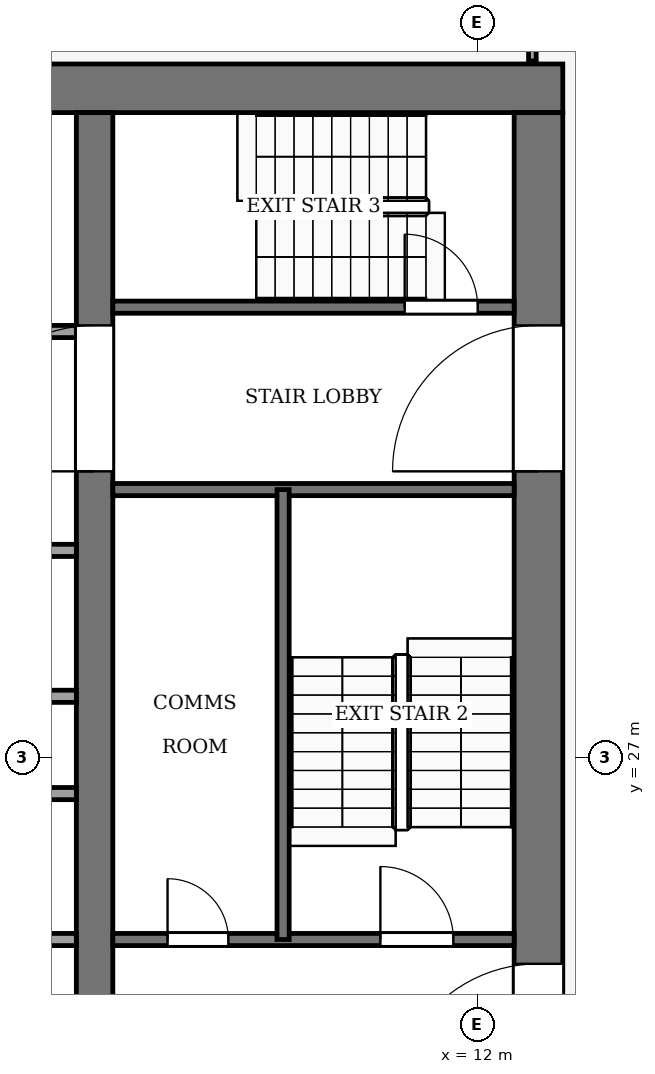
"""IFC4 building model, lengths in metres.
Left out: names, types, materials, properties, quantities, classifications, styles, units other than length and angle.
Written with IfcOpenShell. Run it as: python <this file> out.ifc"""

import sys

from ifc_helpers import new_model, si_unit, direction, frame, frame_2d, origin, place, context, subcontext, project, spatial, rectangle, extrude, element, fill, save


model = new_model("IFC4")
c1 = context("Model", 3, precision=1e-05, world=origin(), true_north=direction((0.0, 1.0)))
c2 = subcontext(c1, "Body", "Model", "MODEL_VIEW")
j1 = project(units=[si_unit("LENGTHUNIT", "METRE"), si_unit("PLANEANGLEUNIT", "RADIAN")], contexts=[c1])
p1 = place(None, origin())
s1 = spatial("IfcSite", under=j1, at=p1, CompositionType="ELEMENT")
p2 = place(p1, origin())
s2 = spatial("IfcBuilding", under=s1, at=p2, CompositionType="ELEMENT")
p3 = place(p2, frame((0.0, 0.0, 282.0)))
s3 = spatial("IfcBuildingStorey", under=s2, at=p3, CompositionType="ELEMENT", Elevation=282.0)
p4 = place(p3, frame((-13.4, 38.0, -0.25), z_axis=(0.0, 0.0, 1.0), x_axis=(1.0, 0.0, 0.0)))
e1 = element("IfcWall", 1, at=p4, inside=s3, PredefinedType="SHEAR", context=c2, shape_type="SweptSolid", body=[
    extrude(rectangle(XDim=26.8, YDim=0.8, at=frame_2d((13.4, 0.0))), origin(), (0.0, 0.0, 1.0), 7.12),
])
p5 = place(p3, frame((13.0, 18.4, -0.25), z_axis=(0.0, 0.0, 1.0), x_axis=(0.0, 1.0, 0.0)))
e2 = element("IfcWall", 2, at=p5, inside=s3, PredefinedType="SHEAR", context=c2, shape_type="SweptSolid", body=[
    extrude(rectangle(XDim=19.2, YDim=0.8, at=frame_2d((9.6, 0.0))), origin(), (0.0, 0.0, 1.0), 7.12),
])
p6 = place(p5, frame((2.8, 0.0, 0.25)))
e3 = element("IfcOpeningElement", 3, at=p6, cuts=e2, PredefinedType="OPENING", context=c2, shape_type="SweptSolid", body=[
    extrude(rectangle(XDim=2.4, YDim=2.4, at=frame_2d((1.2, 1.2))), frame((0.0, 0.41, 0.0), z_axis=(0.0, -1.0, 0.0), x_axis=(1.0, 0.0, 0.0)), (0.0, 0.0, 1.0), 0.82),
])
p7 = place(p5, frame((13.3, 0.0, 0.25)))
e4 = element("IfcOpeningElement", 4, at=p7, cuts=e2, PredefinedType="OPENING", context=c2, shape_type="SweptSolid", body=[
    extrude(rectangle(XDim=2.4, YDim=2.4, at=frame_2d((1.2, 1.2))), frame((0.0, 0.41, 0.0), z_axis=(0.0, -1.0, 0.0), x_axis=(1.0, 0.0, 0.0)), (0.0, 0.0, 1.0), 0.82),
])
p8 = place(p3, frame((5.7, 18.4, -0.25), z_axis=(0.0, 0.0, 1.0), x_axis=(0.0, 1.0, 0.0)))
e5 = element("IfcWall", 5, at=p8, inside=s3, PredefinedType="SHEAR", context=c2, shape_type="SweptSolid", body=[
    extrude(rectangle(XDim=19.2, YDim=0.6, at=frame_2d((9.6, 0.0))), origin(), (0.0, 0.0, 1.0), 7.12),
])
p9 = place(p8, frame((13.3, 0.0, 0.25)))
e6 = element("IfcOpeningElement", 6, at=p9, cuts=e5, PredefinedType="OPENING", context=c2, shape_type="SweptSolid", body=[
    extrude(rectangle(XDim=2.4, YDim=2.4, at=frame_2d((1.2, 1.2))), frame((0.0, 0.31, 0.0), z_axis=(0.0, -1.0, 0.0), x_axis=(1.0, 0.0, 0.0)), (0.0, 0.0, 1.0), 0.62),
])
p10 = place(p3, frame((-5.4, 24.0, 0.0), z_axis=(0.0, 0.0, 1.0), x_axis=(1.0, 0.0, 0.0)))
e7 = element("IfcWall", 7, at=p10, inside=s3, PredefinedType="PARTITIONING", context=c2, shape_type="SweptSolid", body=[
    extrude(rectangle(XDim=10.8, YDim=0.2, at=frame_2d((5.4, 0.0))), origin(), (0.0, 0.0, 1.0), 6.87),
])
p11 = place(p3, frame((6.0, 24.0, 0.0), z_axis=(0.0, 0.0, 1.0), x_axis=(1.0, 0.0, 0.0)))
e8 = element("IfcWall", 8, at=p11, inside=s3, PredefinedType="PARTITIONING", context=c2, shape_type="SweptSolid", body=[
    extrude(rectangle(XDim=6.6, YDim=0.2, at=frame_2d((3.3, 0.0))), origin(), (0.0, 0.0, 1.0), 6.87),
])
p12 = place(p11, frame((0.9, 0.0, 0.0)))
e9 = element("IfcOpeningElement", 9, at=p12, cuts=e8, PredefinedType="OPENING", context=c2, shape_type="SweptSolid", body=[
    extrude(rectangle(XDim=1.0, YDim=2.1, at=frame_2d((0.5, 1.05))), frame((0.0, 0.11, 0.0), z_axis=(0.0, -1.0, 0.0), x_axis=(1.0, 0.0, 0.0)), (0.0, 0.0, 1.0), 0.22),
])
p13 = place(p11, frame((4.4, 0.0, 0.0)))
e10 = element("IfcOpeningElement", 10, at=p13, cuts=e8, PredefinedType="OPENING", context=c2, shape_type="SweptSolid", body=[
    extrude(rectangle(XDim=1.2, YDim=2.2, at=frame_2d((0.6, 1.1))), frame((0.0, 0.11, 0.0), z_axis=(0.0, -1.0, 0.0), x_axis=(1.0, 0.0, 0.0)), (0.0, 0.0, 1.0), 0.22),
])
for number, where, z_axis, x_axis in (
    (11, (-5.4, 26.4, 0.0), (0.0, 0.0, 1.0), (1.0, 0.0, 0.0)),
    (12, (-5.4, 28.0, 0.0), (0.0, 0.0, 1.0), (1.0, 0.0, 0.0)),
):
    element("IfcWall", number, at=place(p3, frame(where, z_axis=z_axis, x_axis=x_axis)), inside=s3, PredefinedType="PARTITIONING", context=c2, shape_type="SweptSolid", body=[
        extrude(rectangle(XDim=10.8, YDim=0.2, at=frame_2d((5.4, 0.0))), origin(), (0.0, 0.0, 1.0), 6.87),
    ])
p14 = place(p3, frame((-5.4, 30.4, 0.0), z_axis=(0.0, 0.0, 1.0), x_axis=(1.0, 0.0, 0.0)))
e13 = element("IfcWall", 13, at=p14, inside=s3, PredefinedType="PARTITIONING", context=c2, shape_type="SweptSolid", body=[
    extrude(rectangle(XDim=10.8, YDim=0.2, at=frame_2d((5.4, 0.0))), origin(), (0.0, 0.0, 1.0), 6.87),
])
p15 = place(p14, frame((4.9, 0.0, 0.0)))
e14 = element("IfcOpeningElement", 14, at=p15, cuts=e13, PredefinedType="OPENING", context=c2, shape_type="SweptSolid", body=[
    extrude(rectangle(XDim=1.0, YDim=2.1, at=frame_2d((0.5, 1.05))), frame((0.0, 0.11, 0.0), z_axis=(0.0, -1.0, 0.0), x_axis=(1.0, 0.0, 0.0)), (0.0, 0.0, 1.0), 0.22),
])
p16 = place(p3, frame((6.0, 31.4, 0.0), z_axis=(0.0, 0.0, 1.0), x_axis=(1.0, 0.0, 0.0)))
e15 = element("IfcWall", 15, at=p16, inside=s3, PredefinedType="PARTITIONING", context=c2, shape_type="SweptSolid", body=[
    extrude(rectangle(XDim=6.6, YDim=0.2, at=frame_2d((3.3, 0.0))), origin(), (0.0, 0.0, 1.0), 6.87),
])
p17 = place(p3, frame((-5.4, 34.0, 0.0), z_axis=(0.0, 0.0, 1.0), x_axis=(1.0, 0.0, 0.0)))
e16 = element("IfcWall", 16, at=p17, inside=s3, PredefinedType="PARTITIONING", context=c2, shape_type="SweptSolid", body=[
    extrude(rectangle(XDim=10.8, YDim=0.2, at=frame_2d((5.4, 0.0))), origin(), (0.0, 0.0, 1.0), 6.87),
])
p18 = place(p17, frame((6.15, 0.0, 0.0)))
e17 = element("IfcOpeningElement", 17, at=p18, cuts=e16, PredefinedType="OPENING", context=c2, shape_type="SweptSolid", body=[
    extrude(rectangle(XDim=1.2, YDim=2.2, at=frame_2d((0.6, 1.1))), frame((0.0, 0.11, 0.0), z_axis=(0.0, -1.0, 0.0), x_axis=(1.0, 0.0, 0.0)), (0.0, 0.0, 1.0), 0.22),
])
p19 = place(p17, frame((8.95, 0.0, 0.0)))
e18 = element("IfcOpeningElement", 18, at=p19, cuts=e16, PredefinedType="OPENING", context=c2, shape_type="SweptSolid", body=[
    extrude(rectangle(XDim=1.0, YDim=2.1, at=frame_2d((0.5, 1.05))), frame((0.0, 0.11, 0.0), z_axis=(0.0, -1.0, 0.0), x_axis=(1.0, 0.0, 0.0)), (0.0, 0.0, 1.0), 0.22),
])
p20 = place(p3, frame((6.0, 34.4, 0.0), z_axis=(0.0, 0.0, 1.0), x_axis=(1.0, 0.0, 0.0)))
e19 = element("IfcWall", 19, at=p20, inside=s3, PredefinedType="PARTITIONING", context=c2, shape_type="SweptSolid", body=[
    extrude(rectangle(XDim=6.6, YDim=0.2, at=frame_2d((3.3, 0.0))), origin(), (0.0, 0.0, 1.0), 6.87),
])
p21 = place(p20, frame((4.8, 0.0, 0.0)))
e20 = element("IfcOpeningElement", 20, at=p21, cuts=e19, PredefinedType="OPENING", context=c2, shape_type="SweptSolid", body=[
    extrude(rectangle(XDim=1.2, YDim=2.2, at=frame_2d((0.6, 1.1))), frame((0.0, 0.11, 0.0), z_axis=(0.0, -1.0, 0.0), x_axis=(1.0, 0.0, 0.0)), (0.0, 0.0, 1.0), 0.22),
])
p22 = place(p3, frame((8.8, 24.0, 0.0), z_axis=(0.0, 0.0, 1.0), x_axis=(0.0, 1.0, 0.0)))
e21 = element("IfcWall", 21, at=p22, inside=s3, PredefinedType="PARTITIONING", context=c2, shape_type="SweptSolid", body=[
    extrude(rectangle(XDim=7.4, YDim=0.2, at=frame_2d((3.7, 0.0))), origin(), (0.0, 0.0, 1.0), 6.87),
])
p23 = place(p3, frame((12.9, 38.45, 0.0), z_axis=(0.0, 0.0, 1.0), x_axis=(0.0, 1.0, 0.0)))
e22 = element("IfcWall", 22, at=p23, inside=s3, PredefinedType="PARTITIONING", context=c2, shape_type="SweptSolid", body=[
    extrude(rectangle(XDim=28.508, YDim=0.125, at=frame_2d((14.254, 0.0))), origin(), (0.0, 0.0, 1.0), 6.35),
])
p24 = place(p12, origin())
e23 = element("IfcDoor", 23, at=p24, inside=s3, OperationType="SINGLE_SWING_RIGHT", PredefinedType="DOOR", context=c2, shape_type="SweptSolid", body=[
    extrude(rectangle(XDim=1.0, YDim=2.1, at=frame_2d((0.5, 1.05))), frame((0.0, 0.025, 0.0), z_axis=(0.0, -1.0, 0.0), x_axis=(1.0, 0.0, 0.0)), (0.0, 0.0, 1.0), 0.05),
])
fill(e9, e23)
p25 = place(p13, origin())
e24 = element("IfcDoor", 24, at=p25, inside=s3, OperationType="SINGLE_SWING_RIGHT", PredefinedType="DOOR", context=c2, shape_type="SweptSolid", body=[
    extrude(rectangle(XDim=1.2, YDim=2.2, at=frame_2d((0.6, 1.1))), frame((0.0, 0.025, 0.0), z_axis=(0.0, -1.0, 0.0), x_axis=(1.0, 0.0, 0.0)), (0.0, 0.0, 1.0), 0.05),
])
fill(e10, e24)
p26 = place(p21, origin())
e25 = element("IfcDoor", 25, at=p26, inside=s3, OperationType="SINGLE_SWING_LEFT", PredefinedType="DOOR", context=c2, shape_type="SweptSolid", body=[
    extrude(rectangle(XDim=1.2, YDim=2.2, at=frame_2d((0.6, 1.1))), frame((0.0, 0.025, 0.0), z_axis=(0.0, -1.0, 0.0), x_axis=(1.0, 0.0, 0.0)), (0.0, 0.0, 1.0), 0.05),
])
fill(e20, e25)
p27 = place(p9, origin())
e26 = element("IfcDoor", 26, at=p27, inside=s3, OperationType="DOUBLE_DOOR_SINGLE_SWING", PredefinedType="DOOR", context=c2, shape_type="SweptSolid", body=[
    extrude(rectangle(XDim=2.4, YDim=2.4, at=frame_2d((1.2, 1.2))), frame((0.0, 0.025, 0.0), z_axis=(0.0, -1.0, 0.0), x_axis=(1.0, 0.0, 0.0)), (0.0, 0.0, 1.0), 0.05),
])
fill(e6, e26)
p28 = place(p6, origin())
e27 = element("IfcDoor", 27, at=p28, inside=s3, OperationType="DOUBLE_DOOR_SINGLE_SWING", PredefinedType="DOOR", context=c2, shape_type="SweptSolid", body=[
    extrude(rectangle(XDim=2.4, YDim=2.4, at=frame_2d((1.2, 1.2))), frame((0.0, 0.025, 0.0), z_axis=(0.0, -1.0, 0.0), x_axis=(1.0, 0.0, 0.0)), (0.0, 0.0, 1.0), 0.05),
])
fill(e3, e27)
p29 = place(p7, origin())
e28 = element("IfcDoor", 28, at=p29, inside=s3, OperationType="DOUBLE_DOOR_SINGLE_SWING", PredefinedType="DOOR", context=c2, shape_type="SweptSolid", body=[
    extrude(rectangle(XDim=2.4, YDim=2.4, at=frame_2d((1.2, 1.2))), frame((0.0, 0.025, 0.0), z_axis=(0.0, -1.0, 0.0), x_axis=(1.0, 0.0, 0.0)), (0.0, 0.0, 1.0), 0.05),
])
fill(e4, e28)
save(model, sys.argv[1])
